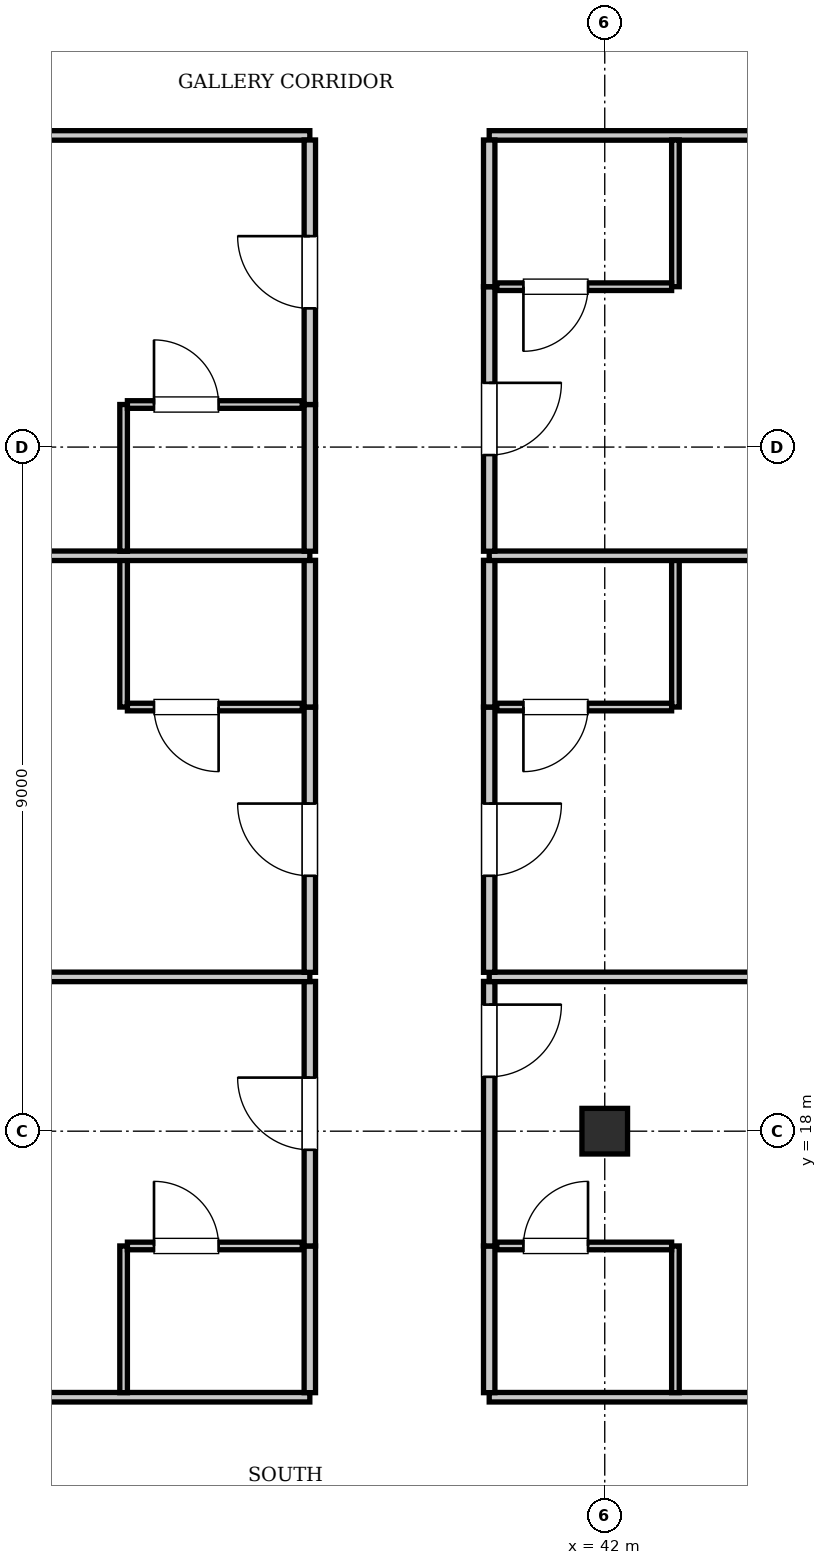
"""IFC4 building model, lengths in metres.
Left out: names, types, materials, properties, quantities, classifications, styles, units other than length and angle.
Written with IfcOpenShell. Run it as: python <this file> out.ifc"""

import sys

from ifc_helpers import new_model, si_unit, direction, frame, frame_2d, origin, origin_2d, place, context, subcontext, project, spatial, rectangle, i_section, extrude, element, fill, save


model = new_model("IFC4")
c1 = context("Model", 3, precision=1e-05, world=origin(), true_north=direction((0.0, 1.0)))
c2 = subcontext(c1, "Body", "Model", "MODEL_VIEW")
j1 = project(units=[si_unit("LENGTHUNIT", "METRE"), si_unit("PLANEANGLEUNIT", "RADIAN")], contexts=[c1])
p1 = place(None, origin())
s1 = spatial("IfcSite", under=j1, at=p1, CompositionType="ELEMENT")
p2 = place(p1, origin())
s2 = spatial("IfcBuilding", under=s1, at=p2, CompositionType="ELEMENT")
p3 = place(p2, frame((0.0, 0.0, 150.5)))
s3 = spatial("IfcBuildingStorey", under=s2, at=p3, CompositionType="ELEMENT", Elevation=150.5)
p4 = place(p3, frame((42.0, 18.0, 0.0), z_axis=(0.0, 0.0, 1.0), x_axis=(1.0, 0.0, 0.0)))
e1 = element("IfcColumn", 1, at=p4, inside=s3, PredefinedType="COLUMN", context=c2, shape_type="SweptSolid", body=[
    extrude(i_section(OverallWidth=0.6, OverallDepth=0.6, WebThickness=0.025, FlangeThickness=0.038, at=origin_2d()), origin(), (0.0, 0.0, 1.0), 3.85),
])
p5 = place(p3, frame((13.2, 14.5, 0.0), z_axis=(0.0, 0.0, 1.0), x_axis=(1.0, 0.0, 0.0)))
e2 = element("IfcWall", 2, at=p5, inside=s3, PredefinedType="PARTITIONING", context=c2, shape_type="SweptSolid", body=[
    extrude(rectangle(XDim=24.92, YDim=0.125, at=frame_2d((12.46, 0.0))), origin(), (0.0, 0.0, 1.0), 3.61),
])
p6 = place(p3, frame((40.48, 14.5, 0.0), z_axis=(0.0, 0.0, 1.0), x_axis=(1.0, 0.0, 0.0)))
e3 = element("IfcWall", 3, at=p6, inside=s3, PredefinedType="PARTITIONING", context=c2, shape_type="SweptSolid", body=[
    extrude(rectangle(XDim=21.92, YDim=0.125, at=frame_2d((10.96, 0.0))), origin(), (0.0, 0.0, 1.0), 3.61),
])
p7 = place(p3, frame((13.2, 31.1, 0.0), z_axis=(0.0, 0.0, 1.0), x_axis=(1.0, 0.0, 0.0)))
e4 = element("IfcWall", 4, at=p7, inside=s3, PredefinedType="PARTITIONING", context=c2, shape_type="SweptSolid", body=[
    extrude(rectangle(XDim=24.92, YDim=0.125, at=frame_2d((12.46, 0.0))), origin(), (0.0, 0.0, 1.0), 3.61),
])
p8 = place(p3, frame((40.48, 31.1, 0.0), z_axis=(0.0, 0.0, 1.0), x_axis=(1.0, 0.0, 0.0)))
e5 = element("IfcWall", 5, at=p8, inside=s3, PredefinedType="PARTITIONING", context=c2, shape_type="SweptSolid", body=[
    extrude(rectangle(XDim=21.92, YDim=0.125, at=frame_2d((10.96, 0.0))), origin(), (0.0, 0.0, 1.0), 3.61),
])
p9 = place(p3, frame((38.12, 14.56, 0.0), z_axis=(0.0, 0.0, 1.0), x_axis=(0.0, 1.0, 0.0)))
e6 = element("IfcWall", 6, at=p9, inside=s3, PredefinedType="PARTITIONING", context=c2, shape_type="SweptSolid", body=[
    extrude(rectangle(XDim=1.93, YDim=0.15, at=frame_2d((0.965, 0.0))), origin(), (0.0, 0.0, 1.0), 3.61),
])
p10 = place(p3, frame((38.12, 16.49, 0.0), z_axis=(0.0, 0.0, 1.0), x_axis=(0.0, 1.0, 0.0)))
e7 = element("IfcWall", 7, at=p10, inside=s3, PredefinedType="PARTITIONING", context=c2, shape_type="SweptSolid", body=[
    extrude(rectangle(XDim=3.48, YDim=0.15, at=frame_2d((1.74, 0.0))), origin(), (0.0, 0.0, 1.0), 3.61),
])
p11 = place(p10, frame((1.265, 0.0, 0.0)))
e8 = element("IfcOpeningElement", 8, at=p11, cuts=e7, PredefinedType="OPENING", context=c2, shape_type="SweptSolid", body=[
    extrude(rectangle(XDim=0.95, YDim=2.15, at=frame_2d((0.475, 1.075))), frame((0.0, 0.085, 0.0), z_axis=(0.0, -1.0, 0.0), x_axis=(1.0, 0.0, 0.0)), (0.0, 0.0, 1.0), 0.17),
])
p12 = place(p3, frame((35.67, 14.56, 0.0), z_axis=(0.0, 0.0, 1.0), x_axis=(0.0, 1.0, 0.0)))
e9 = element("IfcWall", 9, at=p12, inside=s3, PredefinedType="PARTITIONING", context=c2, shape_type="SweptSolid", body=[
    extrude(rectangle(XDim=1.93, YDim=0.1, at=frame_2d((0.965, 0.0))), origin(), (0.0, 0.0, 1.0), 3.61),
])
p13 = place(p3, frame((35.72, 16.49, 0.0), z_axis=(0.0, 0.0, 1.0), x_axis=(1.0, 0.0, 0.0)))
e10 = element("IfcWall", 10, at=p13, inside=s3, PredefinedType="PARTITIONING", context=c2, shape_type="SweptSolid", body=[
    extrude(rectangle(XDim=2.3, YDim=0.1, at=frame_2d((1.15, 0.0))), origin(), (0.0, 0.0, 1.0), 3.61),
])
p14 = place(p13, frame((0.35, 0.0, 0.0)))
e11 = element("IfcOpeningElement", 11, at=p14, cuts=e10, PredefinedType="OPENING", context=c2, shape_type="SweptSolid", body=[
    extrude(rectangle(XDim=0.85, YDim=2.1, at=frame_2d((0.425, 1.05))), frame((0.0, 0.06, 0.0), z_axis=(0.0, -1.0, 0.0), x_axis=(1.0, 0.0, 0.0)), (0.0, 0.0, 1.0), 0.12),
])
p15 = place(p3, frame((40.48, 14.56, 0.0), z_axis=(0.0, 0.0, 1.0), x_axis=(0.0, 1.0, 0.0)))
e12 = element("IfcWall", 12, at=p15, inside=s3, PredefinedType="PARTITIONING", context=c2, shape_type="SweptSolid", body=[
    extrude(rectangle(XDim=1.93, YDim=0.15, at=frame_2d((0.965, 0.0))), origin(), (0.0, 0.0, 1.0), 3.61),
])
p16 = place(p3, frame((40.48, 16.49, 0.0), z_axis=(0.0, 0.0, 1.0), x_axis=(0.0, 1.0, 0.0)))
e13 = element("IfcWall", 13, at=p16, inside=s3, PredefinedType="PARTITIONING", context=c2, shape_type="SweptSolid", body=[
    extrude(rectangle(XDim=3.48, YDim=0.15, at=frame_2d((1.74, 0.0))), origin(), (0.0, 0.0, 1.0), 3.61),
])
p17 = place(p16, frame((2.225, 0.0, 0.0)))
e14 = element("IfcOpeningElement", 14, at=p17, cuts=e13, PredefinedType="OPENING", context=c2, shape_type="SweptSolid", body=[
    extrude(rectangle(XDim=0.95, YDim=2.15, at=frame_2d((0.475, 1.075))), frame((0.0, 0.085, 0.0), z_axis=(0.0, -1.0, 0.0), x_axis=(1.0, 0.0, 0.0)), (0.0, 0.0, 1.0), 0.17),
])
p18 = place(p3, frame((42.93, 14.56, 0.0), z_axis=(0.0, 0.0, 1.0), x_axis=(0.0, 1.0, 0.0)))
e15 = element("IfcWall", 15, at=p18, inside=s3, PredefinedType="PARTITIONING", context=c2, shape_type="SweptSolid", body=[
    extrude(rectangle(XDim=1.93, YDim=0.1, at=frame_2d((0.965, 0.0))), origin(), (0.0, 0.0, 1.0), 3.61),
])
p19 = place(p3, frame((40.58, 16.49, 0.0), z_axis=(0.0, 0.0, 1.0), x_axis=(1.0, 0.0, 0.0)))
e16 = element("IfcWall", 16, at=p19, inside=s3, PredefinedType="PARTITIONING", context=c2, shape_type="SweptSolid", body=[
    extrude(rectangle(XDim=2.3, YDim=0.1, at=frame_2d((1.15, 0.0))), origin(), (0.0, 0.0, 1.0), 3.61),
])
p20 = place(p19, frame((0.35, 0.0, 0.0)))
e17 = element("IfcOpeningElement", 17, at=p20, cuts=e16, PredefinedType="OPENING", context=c2, shape_type="SweptSolid", body=[
    extrude(rectangle(XDim=0.85, YDim=2.1, at=frame_2d((0.425, 1.05))), frame((0.0, 0.06, 0.0), z_axis=(0.0, -1.0, 0.0), x_axis=(1.0, 0.0, 0.0)), (0.0, 0.0, 1.0), 0.12),
])
p21 = place(p3, frame((13.2, 20.03, 0.0), z_axis=(0.0, 0.0, 1.0), x_axis=(1.0, 0.0, 0.0)))
e18 = element("IfcWall", 18, at=p21, inside=s3, PredefinedType="PARTITIONING", context=c2, shape_type="SweptSolid", body=[
    extrude(rectangle(XDim=24.92, YDim=0.125, at=frame_2d((12.46, 0.0))), origin(), (0.0, 0.0, 1.0), 3.61),
])
p22 = place(p3, frame((40.48, 20.03, 0.0), z_axis=(0.0, 0.0, 1.0), x_axis=(1.0, 0.0, 0.0)))
e19 = element("IfcWall", 19, at=p22, inside=s3, PredefinedType="PARTITIONING", context=c2, shape_type="SweptSolid", body=[
    extrude(rectangle(XDim=21.92, YDim=0.125, at=frame_2d((10.96, 0.0))), origin(), (0.0, 0.0, 1.0), 3.61),
])
p23 = place(p3, frame((38.12, 20.09, 0.0), z_axis=(0.0, 0.0, 1.0), x_axis=(0.0, 1.0, 0.0)))
e20 = element("IfcWall", 20, at=p23, inside=s3, PredefinedType="PARTITIONING", context=c2, shape_type="SweptSolid", body=[
    extrude(rectangle(XDim=3.49, YDim=0.15, at=frame_2d((1.745, 0.0))), origin(), (0.0, 0.0, 1.0), 3.61),
])
p24 = place(p23, frame((1.27, 0.0, 0.0)))
e21 = element("IfcOpeningElement", 21, at=p24, cuts=e20, PredefinedType="OPENING", context=c2, shape_type="SweptSolid", body=[
    extrude(rectangle(XDim=0.95, YDim=2.15, at=frame_2d((0.475, 1.075))), frame((0.0, 0.085, 0.0), z_axis=(0.0, -1.0, 0.0), x_axis=(1.0, 0.0, 0.0)), (0.0, 0.0, 1.0), 0.17),
])
p25 = place(p3, frame((38.12, 23.58, 0.0), z_axis=(0.0, 0.0, 1.0), x_axis=(0.0, 1.0, 0.0)))
e22 = element("IfcWall", 22, at=p25, inside=s3, PredefinedType="PARTITIONING", context=c2, shape_type="SweptSolid", body=[
    extrude(rectangle(XDim=1.93, YDim=0.15, at=frame_2d((0.965, 0.0))), origin(), (0.0, 0.0, 1.0), 3.61),
])
p26 = place(p3, frame((35.67, 23.58, 0.0), z_axis=(0.0, 0.0, 1.0), x_axis=(0.0, 1.0, 0.0)))
e23 = element("IfcWall", 23, at=p26, inside=s3, PredefinedType="PARTITIONING", context=c2, shape_type="SweptSolid", body=[
    extrude(rectangle(XDim=1.93, YDim=0.1, at=frame_2d((0.965, 0.0))), origin(), (0.0, 0.0, 1.0), 3.61),
])
p27 = place(p3, frame((35.72, 23.58, 0.0), z_axis=(0.0, 0.0, 1.0), x_axis=(1.0, 0.0, 0.0)))
e24 = element("IfcWall", 24, at=p27, inside=s3, PredefinedType="PARTITIONING", context=c2, shape_type="SweptSolid", body=[
    extrude(rectangle(XDim=2.3, YDim=0.1, at=frame_2d((1.15, 0.0))), origin(), (0.0, 0.0, 1.0), 3.61),
])
p28 = place(p27, frame((0.35, 0.0, 0.0)))
e25 = element("IfcOpeningElement", 25, at=p28, cuts=e24, PredefinedType="OPENING", context=c2, shape_type="SweptSolid", body=[
    extrude(rectangle(XDim=0.85, YDim=2.1, at=frame_2d((0.425, 1.05))), frame((0.0, 0.06, 0.0), z_axis=(0.0, -1.0, 0.0), x_axis=(1.0, 0.0, 0.0)), (0.0, 0.0, 1.0), 0.12),
])
p29 = place(p3, frame((40.48, 20.09, 0.0), z_axis=(0.0, 0.0, 1.0), x_axis=(0.0, 1.0, 0.0)))
e26 = element("IfcWall", 26, at=p29, inside=s3, PredefinedType="PARTITIONING", context=c2, shape_type="SweptSolid", body=[
    extrude(rectangle(XDim=3.49, YDim=0.15, at=frame_2d((1.745, 0.0))), origin(), (0.0, 0.0, 1.0), 3.61),
])
p30 = place(p29, frame((1.27, 0.0, 0.0)))
e27 = element("IfcOpeningElement", 27, at=p30, cuts=e26, PredefinedType="OPENING", context=c2, shape_type="SweptSolid", body=[
    extrude(rectangle(XDim=0.95, YDim=2.15, at=frame_2d((0.475, 1.075))), frame((0.0, 0.085, 0.0), z_axis=(0.0, -1.0, 0.0), x_axis=(1.0, 0.0, 0.0)), (0.0, 0.0, 1.0), 0.17),
])
p31 = place(p3, frame((40.48, 23.58, 0.0), z_axis=(0.0, 0.0, 1.0), x_axis=(0.0, 1.0, 0.0)))
e28 = element("IfcWall", 28, at=p31, inside=s3, PredefinedType="PARTITIONING", context=c2, shape_type="SweptSolid", body=[
    extrude(rectangle(XDim=1.93, YDim=0.15, at=frame_2d((0.965, 0.0))), origin(), (0.0, 0.0, 1.0), 3.61),
])
p32 = place(p3, frame((42.93, 23.58, 0.0), z_axis=(0.0, 0.0, 1.0), x_axis=(0.0, 1.0, 0.0)))
e29 = element("IfcWall", 29, at=p32, inside=s3, PredefinedType="PARTITIONING", context=c2, shape_type="SweptSolid", body=[
    extrude(rectangle(XDim=1.93, YDim=0.1, at=frame_2d((0.965, 0.0))), origin(), (0.0, 0.0, 1.0), 3.61),
])
p33 = place(p3, frame((40.58, 23.58, 0.0), z_axis=(0.0, 0.0, 1.0), x_axis=(1.0, 0.0, 0.0)))
e30 = element("IfcWall", 30, at=p33, inside=s3, PredefinedType="PARTITIONING", context=c2, shape_type="SweptSolid", body=[
    extrude(rectangle(XDim=2.3, YDim=0.1, at=frame_2d((1.15, 0.0))), origin(), (0.0, 0.0, 1.0), 3.61),
])
p34 = place(p33, frame((0.35, 0.0, 0.0)))
e31 = element("IfcOpeningElement", 31, at=p34, cuts=e30, PredefinedType="OPENING", context=c2, shape_type="SweptSolid", body=[
    extrude(rectangle(XDim=0.85, YDim=2.1, at=frame_2d((0.425, 1.05))), frame((0.0, 0.06, 0.0), z_axis=(0.0, -1.0, 0.0), x_axis=(1.0, 0.0, 0.0)), (0.0, 0.0, 1.0), 0.12),
])
p35 = place(p3, frame((13.2, 25.57, 0.0), z_axis=(0.0, 0.0, 1.0), x_axis=(1.0, 0.0, 0.0)))
e32 = element("IfcWall", 32, at=p35, inside=s3, PredefinedType="PARTITIONING", context=c2, shape_type="SweptSolid", body=[
    extrude(rectangle(XDim=24.92, YDim=0.125, at=frame_2d((12.46, 0.0))), origin(), (0.0, 0.0, 1.0), 3.61),
])
p36 = place(p3, frame((40.48, 25.57, 0.0), z_axis=(0.0, 0.0, 1.0), x_axis=(1.0, 0.0, 0.0)))
e33 = element("IfcWall", 33, at=p36, inside=s3, PredefinedType="PARTITIONING", context=c2, shape_type="SweptSolid", body=[
    extrude(rectangle(XDim=21.92, YDim=0.125, at=frame_2d((10.96, 0.0))), origin(), (0.0, 0.0, 1.0), 3.61),
])
p37 = place(p3, frame((38.12, 25.63, 0.0), z_axis=(0.0, 0.0, 1.0), x_axis=(0.0, 1.0, 0.0)))
e34 = element("IfcWall", 34, at=p37, inside=s3, PredefinedType="PARTITIONING", context=c2, shape_type="SweptSolid", body=[
    extrude(rectangle(XDim=1.93, YDim=0.15, at=frame_2d((0.965, 0.0))), origin(), (0.0, 0.0, 1.0), 3.61),
])
p38 = place(p3, frame((38.12, 27.56, 0.0), z_axis=(0.0, 0.0, 1.0), x_axis=(0.0, 1.0, 0.0)))
e35 = element("IfcWall", 35, at=p38, inside=s3, PredefinedType="PARTITIONING", context=c2, shape_type="SweptSolid", body=[
    extrude(rectangle(XDim=3.48, YDim=0.15, at=frame_2d((1.74, 0.0))), origin(), (0.0, 0.0, 1.0), 3.61),
])
p39 = place(p38, frame((1.265, 0.0, 0.0)))
e36 = element("IfcOpeningElement", 36, at=p39, cuts=e35, PredefinedType="OPENING", context=c2, shape_type="SweptSolid", body=[
    extrude(rectangle(XDim=0.95, YDim=2.15, at=frame_2d((0.475, 1.075))), frame((0.0, 0.085, 0.0), z_axis=(0.0, -1.0, 0.0), x_axis=(1.0, 0.0, 0.0)), (0.0, 0.0, 1.0), 0.17),
])
p40 = place(p3, frame((35.67, 25.63, 0.0), z_axis=(0.0, 0.0, 1.0), x_axis=(0.0, 1.0, 0.0)))
e37 = element("IfcWall", 37, at=p40, inside=s3, PredefinedType="PARTITIONING", context=c2, shape_type="SweptSolid", body=[
    extrude(rectangle(XDim=1.93, YDim=0.1, at=frame_2d((0.965, 0.0))), origin(), (0.0, 0.0, 1.0), 3.61),
])
p41 = place(p3, frame((35.72, 27.56, 0.0), z_axis=(0.0, 0.0, 1.0), x_axis=(1.0, 0.0, 0.0)))
e38 = element("IfcWall", 38, at=p41, inside=s3, PredefinedType="PARTITIONING", context=c2, shape_type="SweptSolid", body=[
    extrude(rectangle(XDim=2.3, YDim=0.1, at=frame_2d((1.15, 0.0))), origin(), (0.0, 0.0, 1.0), 3.61),
])
p42 = place(p41, frame((0.35, 0.0, 0.0)))
e39 = element("IfcOpeningElement", 39, at=p42, cuts=e38, PredefinedType="OPENING", context=c2, shape_type="SweptSolid", body=[
    extrude(rectangle(XDim=0.85, YDim=2.1, at=frame_2d((0.425, 1.05))), frame((0.0, 0.06, 0.0), z_axis=(0.0, -1.0, 0.0), x_axis=(1.0, 0.0, 0.0)), (0.0, 0.0, 1.0), 0.12),
])
p43 = place(p3, frame((40.48, 25.63, 0.0), z_axis=(0.0, 0.0, 1.0), x_axis=(0.0, 1.0, 0.0)))
e40 = element("IfcWall", 40, at=p43, inside=s3, PredefinedType="PARTITIONING", context=c2, shape_type="SweptSolid", body=[
    extrude(rectangle(XDim=3.48, YDim=0.15, at=frame_2d((1.74, 0.0))), origin(), (0.0, 0.0, 1.0), 3.61),
])
p44 = place(p43, frame((1.265, 0.0, 0.0)))
e41 = element("IfcOpeningElement", 41, at=p44, cuts=e40, PredefinedType="OPENING", context=c2, shape_type="SweptSolid", body=[
    extrude(rectangle(XDim=0.95, YDim=2.15, at=frame_2d((0.475, 1.075))), frame((0.0, 0.085, 0.0), z_axis=(0.0, -1.0, 0.0), x_axis=(1.0, 0.0, 0.0)), (0.0, 0.0, 1.0), 0.17),
])
p45 = place(p3, frame((40.48, 29.11, 0.0), z_axis=(0.0, 0.0, 1.0), x_axis=(0.0, 1.0, 0.0)))
e42 = element("IfcWall", 42, at=p45, inside=s3, PredefinedType="PARTITIONING", context=c2, shape_type="SweptSolid", body=[
    extrude(rectangle(XDim=1.93, YDim=0.15, at=frame_2d((0.965, 0.0))), origin(), (0.0, 0.0, 1.0), 3.61),
])
p46 = place(p3, frame((42.93, 29.11, 0.0), z_axis=(0.0, 0.0, 1.0), x_axis=(0.0, 1.0, 0.0)))
e43 = element("IfcWall", 43, at=p46, inside=s3, PredefinedType="PARTITIONING", context=c2, shape_type="SweptSolid", body=[
    extrude(rectangle(XDim=1.93, YDim=0.1, at=frame_2d((0.965, 0.0))), origin(), (0.0, 0.0, 1.0), 3.61),
])
p47 = place(p3, frame((40.58, 29.11, 0.0), z_axis=(0.0, 0.0, 1.0), x_axis=(1.0, 0.0, 0.0)))
e44 = element("IfcWall", 44, at=p47, inside=s3, PredefinedType="PARTITIONING", context=c2, shape_type="SweptSolid", body=[
    extrude(rectangle(XDim=2.3, YDim=0.1, at=frame_2d((1.15, 0.0))), origin(), (0.0, 0.0, 1.0), 3.61),
])
p48 = place(p47, frame((0.35, 0.0, 0.0)))
e45 = element("IfcOpeningElement", 45, at=p48, cuts=e44, PredefinedType="OPENING", context=c2, shape_type="SweptSolid", body=[
    extrude(rectangle(XDim=0.85, YDim=2.1, at=frame_2d((0.425, 1.05))), frame((0.0, 0.06, 0.0), z_axis=(0.0, -1.0, 0.0), x_axis=(1.0, 0.0, 0.0)), (0.0, 0.0, 1.0), 0.12),
])
p49 = place(p14, origin())
e46 = element("IfcDoor", 46, at=p49, inside=s3, OperationType="SINGLE_SWING_LEFT", PredefinedType="DOOR", context=c2, shape_type="SweptSolid", body=[
    extrude(rectangle(XDim=0.85, YDim=2.1, at=frame_2d((0.425, 1.05))), frame((0.0, 0.025, 0.0), z_axis=(0.0, -1.0, 0.0), x_axis=(1.0, 0.0, 0.0)), (0.0, 0.0, 1.0), 0.05),
])
fill(e11, e46)
p50 = place(p11, origin())
e47 = element("IfcDoor", 47, at=p50, inside=s3, OperationType="SINGLE_SWING_RIGHT", PredefinedType="DOOR", context=c2, shape_type="SweptSolid", body=[
    extrude(rectangle(XDim=0.95, YDim=2.15, at=frame_2d((0.475, 1.075))), frame((0.0, 0.025, 0.0), z_axis=(0.0, -1.0, 0.0), x_axis=(1.0, 0.0, 0.0)), (0.0, 0.0, 1.0), 0.05),
])
fill(e8, e47)
p51 = place(p20, origin())
e48 = element("IfcDoor", 48, at=p51, inside=s3, OperationType="SINGLE_SWING_RIGHT", PredefinedType="DOOR", context=c2, shape_type="SweptSolid", body=[
    extrude(rectangle(XDim=0.85, YDim=2.1, at=frame_2d((0.425, 1.05))), frame((0.0, 0.025, 0.0), z_axis=(0.0, -1.0, 0.0), x_axis=(1.0, 0.0, 0.0)), (0.0, 0.0, 1.0), 0.05),
])
fill(e17, e48)
p52 = place(p17, frame((0.95, 0.0, 0.0), z_axis=(0.0, 0.0, 1.0), x_axis=(-1.0, 0.0, 0.0)))
e49 = element("IfcDoor", 49, at=p52, inside=s3, OperationType="SINGLE_SWING_LEFT", PredefinedType="DOOR", context=c2, shape_type="SweptSolid", body=[
    extrude(rectangle(XDim=0.95, YDim=2.15, at=frame_2d((0.475, 1.075))), frame((0.0, 0.025, 0.0), z_axis=(0.0, -1.0, 0.0), x_axis=(1.0, 0.0, 0.0)), (0.0, 0.0, 1.0), 0.05),
])
fill(e14, e49)
p53 = place(p28, frame((0.85, 0.0, 0.0), z_axis=(0.0, 0.0, 1.0), x_axis=(-1.0, 0.0, 0.0)))
e50 = element("IfcDoor", 50, at=p53, inside=s3, OperationType="SINGLE_SWING_LEFT", PredefinedType="DOOR", context=c2, shape_type="SweptSolid", body=[
    extrude(rectangle(XDim=0.85, YDim=2.1, at=frame_2d((0.425, 1.05))), frame((0.0, 0.025, 0.0), z_axis=(0.0, -1.0, 0.0), x_axis=(1.0, 0.0, 0.0)), (0.0, 0.0, 1.0), 0.05),
])
fill(e25, e50)
p54 = place(p24, origin())
e51 = element("IfcDoor", 51, at=p54, inside=s3, OperationType="SINGLE_SWING_RIGHT", PredefinedType="DOOR", context=c2, shape_type="SweptSolid", body=[
    extrude(rectangle(XDim=0.95, YDim=2.15, at=frame_2d((0.475, 1.075))), frame((0.0, 0.025, 0.0), z_axis=(0.0, -1.0, 0.0), x_axis=(1.0, 0.0, 0.0)), (0.0, 0.0, 1.0), 0.05),
])
fill(e21, e51)
p55 = place(p34, frame((0.85, 0.0, 0.0), z_axis=(0.0, 0.0, 1.0), x_axis=(-1.0, 0.0, 0.0)))
e52 = element("IfcDoor", 52, at=p55, inside=s3, OperationType="SINGLE_SWING_RIGHT", PredefinedType="DOOR", context=c2, shape_type="SweptSolid", body=[
    extrude(rectangle(XDim=0.85, YDim=2.1, at=frame_2d((0.425, 1.05))), frame((0.0, 0.025, 0.0), z_axis=(0.0, -1.0, 0.0), x_axis=(1.0, 0.0, 0.0)), (0.0, 0.0, 1.0), 0.05),
])
fill(e31, e52)
p56 = place(p30, frame((0.95, 0.0, 0.0), z_axis=(0.0, 0.0, 1.0), x_axis=(-1.0, 0.0, 0.0)))
e53 = element("IfcDoor", 53, at=p56, inside=s3, OperationType="SINGLE_SWING_LEFT", PredefinedType="DOOR", context=c2, shape_type="SweptSolid", body=[
    extrude(rectangle(XDim=0.95, YDim=2.15, at=frame_2d((0.475, 1.075))), frame((0.0, 0.025, 0.0), z_axis=(0.0, -1.0, 0.0), x_axis=(1.0, 0.0, 0.0)), (0.0, 0.0, 1.0), 0.05),
])
fill(e27, e53)
p57 = place(p42, origin())
e54 = element("IfcDoor", 54, at=p57, inside=s3, OperationType="SINGLE_SWING_LEFT", PredefinedType="DOOR", context=c2, shape_type="SweptSolid", body=[
    extrude(rectangle(XDim=0.85, YDim=2.1, at=frame_2d((0.425, 1.05))), frame((0.0, 0.025, 0.0), z_axis=(0.0, -1.0, 0.0), x_axis=(1.0, 0.0, 0.0)), (0.0, 0.0, 1.0), 0.05),
])
fill(e39, e54)
p58 = place(p39, origin())
e55 = element("IfcDoor", 55, at=p58, inside=s3, OperationType="SINGLE_SWING_RIGHT", PredefinedType="DOOR", context=c2, shape_type="SweptSolid", body=[
    extrude(rectangle(XDim=0.95, YDim=2.15, at=frame_2d((0.475, 1.075))), frame((0.0, 0.025, 0.0), z_axis=(0.0, -1.0, 0.0), x_axis=(1.0, 0.0, 0.0)), (0.0, 0.0, 1.0), 0.05),
])
fill(e36, e55)
p59 = place(p48, frame((0.85, 0.0, 0.0), z_axis=(0.0, 0.0, 1.0), x_axis=(-1.0, 0.0, 0.0)))
e56 = element("IfcDoor", 56, at=p59, inside=s3, OperationType="SINGLE_SWING_RIGHT", PredefinedType="DOOR", context=c2, shape_type="SweptSolid", body=[
    extrude(rectangle(XDim=0.85, YDim=2.1, at=frame_2d((0.425, 1.05))), frame((0.0, 0.025, 0.0), z_axis=(0.0, -1.0, 0.0), x_axis=(1.0, 0.0, 0.0)), (0.0, 0.0, 1.0), 0.05),
])
fill(e45, e56)
p60 = place(p44, frame((0.95, 0.0, 0.0), z_axis=(0.0, 0.0, 1.0), x_axis=(-1.0, 0.0, 0.0)))
e57 = element("IfcDoor", 57, at=p60, inside=s3, OperationType="SINGLE_SWING_LEFT", PredefinedType="DOOR", context=c2, shape_type="SweptSolid", body=[
    extrude(rectangle(XDim=0.95, YDim=2.15, at=frame_2d((0.475, 1.075))), frame((0.0, 0.025, 0.0), z_axis=(0.0, -1.0, 0.0), x_axis=(1.0, 0.0, 0.0)), (0.0, 0.0, 1.0), 0.05),
])
fill(e41, e57)
save(model, sys.argv[1])
